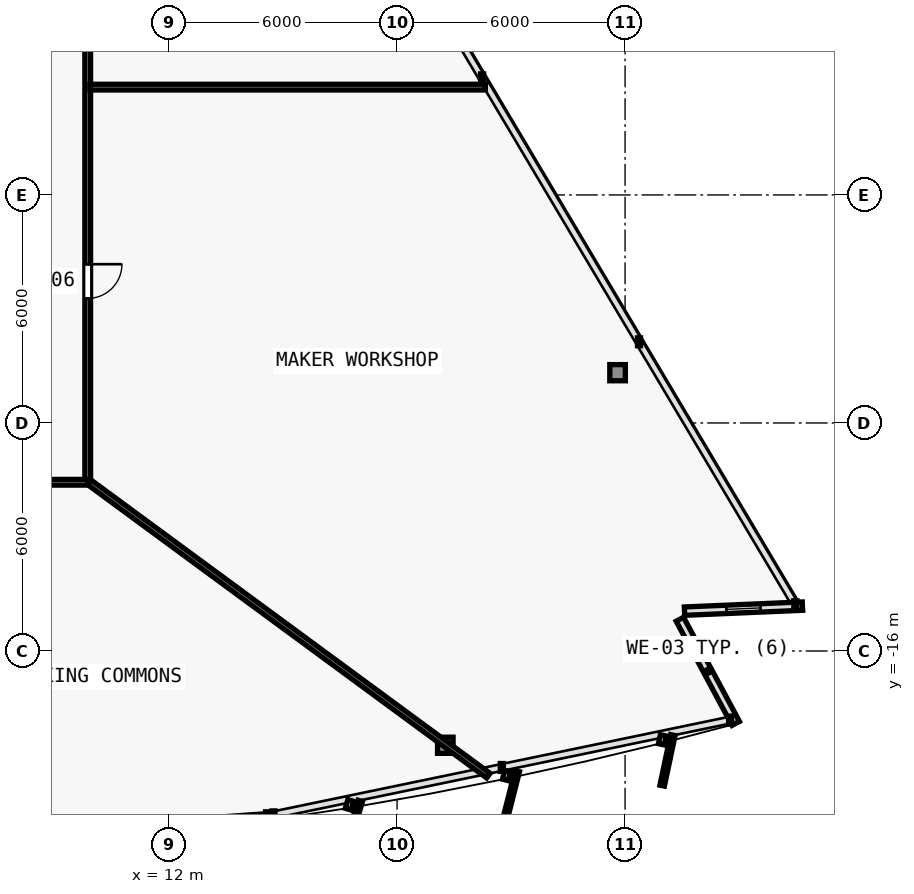
"""IFC4 building model, lengths in metres.
Left out: names, types, materials, properties, quantities, classifications, styles, units other than length and angle.
Written with IfcOpenShell. Run it as: python <this file> out.ifc"""

import sys

from ifc_helpers import new_model, si_unit, direction, frame, frame_2d, origin, origin_2d, place, context, subcontext, project, spatial, rectangle, i_section, extrude, element, fill, save


model = new_model("IFC4")
c1 = context("Model", 3, precision=1e-05, world=origin(), true_north=direction((0.0, 1.0)))
c2 = subcontext(c1, "Body", "Model", "MODEL_VIEW")
j1 = project(units=[si_unit("LENGTHUNIT", "METRE"), si_unit("PLANEANGLEUNIT", "RADIAN")], contexts=[c1])
p1 = place(None, origin())
s1 = spatial("IfcSite", under=j1, at=p1, CompositionType="ELEMENT")
p2 = place(p1, origin())
s2 = spatial("IfcBuilding", under=s1, at=p2, CompositionType="ELEMENT")
p3 = place(p2, frame((0.0, 0.0, 82.5)))
s3 = spatial("IfcBuildingStorey", under=s2, at=p3, CompositionType="ELEMENT", Elevation=82.5)
p4 = place(p3, frame((19.269, -18.48, 0.006), z_axis=(-0.020596292833, 0.033511459955, 0.999226087917), x_axis=(-0.851954850327, -0.523615252838, 0.0)))
e1 = element("IfcColumn", 1, at=p4, inside=s3, PredefinedType="COLUMN", context=c2, shape_type="SweptSolid", body=[
    extrude(i_section(OverallWidth=0.409, OverallDepth=0.425, WebThickness=0.021, FlangeThickness=0.034, FilletRadius=0.015, at=origin_2d()), origin(), (0.0, 0.0, 1.0), 3.592),
])
p5 = place(p3, frame((23.802, -8.677, 0.006), z_axis=(-0.026039494941, 0.021620259507, 0.999427090428), x_axis=(-0.638800249892, -0.769372628015, 0.0)))
e2 = element("IfcColumn", 2, at=p5, inside=s3, PredefinedType="COLUMN", context=c2, shape_type="SweptSolid", body=[
    extrude(i_section(OverallWidth=0.409, OverallDepth=0.425, WebThickness=0.021, FlangeThickness=0.034, FilletRadius=0.015, at=origin_2d()), origin(), (0.0, 0.0, 1.0), 3.591),
])
p6 = place(p3, frame((25.442, -15.165, 0.0), z_axis=(0.0, 0.0, 1.0), x_axis=(0.472811757317, -0.881163459378, 0.0)))
e3 = element("IfcWall", 3, at=p6, inside=s3, PredefinedType="SOLIDWALL", context=c2, shape_type="SweptSolid", body=[
    extrude(rectangle(XDim=3.11, YDim=0.22, at=frame_2d((1.555, 0.0))), origin(), (0.0, 0.0, 1.0), 3.35),
])
p7 = place(p3, frame((28.667, -14.819, 0.0), z_axis=(0.0, 0.0, 1.0), x_axis=(-0.99909228571, -0.042598176436, 0.0)))
e4 = element("IfcWall", 4, at=p7, inside=s3, PredefinedType="SOLIDWALL", context=c2, shape_type="SweptSolid", body=[
    extrude(rectangle(XDim=3.106, YDim=0.22, at=frame_2d((1.553, 0.0))), origin(), (0.0, 0.0, 1.0), 3.35),
])
p8 = place(p7, frame((1.103, 0.0, 0.62)))
e5 = element("IfcOpeningElement", 5, at=p8, cuts=e4, PredefinedType="OPENING", context=c2, shape_type="SweptSolid", body=[
    extrude(rectangle(XDim=0.9, YDim=1.6, at=frame_2d((0.45, 0.8))), frame((0.0, 0.12, 0.0), z_axis=(0.0, -1.0, 0.0), x_axis=(1.0, 0.0, 0.0)), (0.0, 0.0, 1.0), 0.24),
])
p9 = place(p3, frame((9.86, 8.426, 0.0), z_axis=(0.0, 0.0, 1.0), x_axis=(0.0, -1.0, 0.0)))
e6 = element("IfcWall", 6, at=p9, inside=s3, PredefinedType="PARTITIONING", context=c2, shape_type="SweptSolid", body=[
    extrude(rectangle(XDim=19.986, YDim=0.15, at=frame_2d((9.993, 0.0))), origin(), (0.0, 0.0, 1.0), 2.609),
])
p10 = place(p9, frame((14.248, 0.0, 0.0)))
e7 = element("IfcOpeningElement", 7, at=p10, cuts=e6, PredefinedType="OPENING", context=c2, shape_type="SweptSolid", body=[
    extrude(rectangle(XDim=0.9, YDim=2.1, at=frame_2d((0.45, 1.05))), frame((0.0, 0.085, 0.0), z_axis=(0.0, -1.0, 0.0), x_axis=(1.0, 0.0, 0.0)), (0.0, 0.0, 1.0), 0.17),
])
p11 = place(p9, frame((4.434, 0.0, 0.0)))
e8 = element("IfcOpeningElement", 8, at=p11, cuts=e6, PredefinedType="OPENING", context=c2, shape_type="SweptSolid", body=[
    extrude(rectangle(XDim=0.9, YDim=2.1, at=frame_2d((0.45, 1.05))), frame((0.0, 0.085, 0.0), z_axis=(0.0, -1.0, 0.0), x_axis=(1.0, 0.0, 0.0)), (0.0, 0.0, 1.0), 0.17),
])
p12 = place(p3, frame((9.86, -11.56, 0.0), z_axis=(0.0, 0.0, 1.0), x_axis=(-1.0, 0.0, 0.0)))
e9 = element("IfcWall", 9, at=p12, inside=s3, PredefinedType="PARTITIONING", context=c2, shape_type="SweptSolid", body=[
    extrude(rectangle(XDim=6.78, YDim=0.15, at=frame_2d((3.39, 0.0))), origin(), (0.0, 0.0, 1.0), 3.055),
])
p13 = place(p12, frame((2.94, 0.0, 0.0)))
e10 = element("IfcOpeningElement", 10, at=p13, cuts=e9, PredefinedType="OPENING", context=c2, shape_type="SweptSolid", body=[
    extrude(rectangle(XDim=0.9, YDim=2.1, at=frame_2d((0.45, 1.05))), frame((0.0, 0.085, 0.0), z_axis=(0.0, -1.0, 0.0), x_axis=(1.0, 0.0, 0.0)), (0.0, 0.0, 1.0), 0.17),
])
p14 = place(p3, frame((9.896, -11.558, 0.0), z_axis=(0.0, 0.0, 1.0), x_axis=(0.805759814493, -0.592242451492, 0.0)))
e11 = element("IfcWall", 11, at=p14, inside=s3, PredefinedType="PARTITIONING", context=c2, shape_type="SweptSolid", body=[
    extrude(rectangle(XDim=13.038, YDim=0.15, at=frame_2d((6.519, 0.0))), origin(), (0.0, 0.0, 1.0), 2.725),
])
p15 = place(p3, frame((9.92, -1.163, 0.0), z_axis=(0.0, 0.0, 1.0), x_axis=(1.0, 0.0, 0.0)))
e12 = element("IfcWall", 12, at=p15, inside=s3, PredefinedType="PARTITIONING", context=c2, shape_type="SweptSolid", body=[
    extrude(rectangle(XDim=10.404, YDim=0.15, at=frame_2d((5.202, 0.0))), origin(), (0.0, 0.0, 1.0), 2.725),
])
p16 = place(p8, origin())
e13 = element("IfcWindow", 13, at=p16, inside=s3, PartitioningType="SINGLE_PANEL", PredefinedType="WINDOW", context=c2, shape_type="SweptSolid", body=[
    extrude(rectangle(XDim=0.9, YDim=1.6, at=frame_2d((0.45, 0.8))), frame((0.0, 0.03, 0.0), z_axis=(0.0, -1.0, 0.0), x_axis=(1.0, 0.0, 0.0)), (0.0, 0.0, 1.0), 0.06),
])
fill(e5, e13)
p17 = place(p10, origin())
e14 = element("IfcDoor", 14, at=p17, inside=s3, OperationType="SINGLE_SWING_LEFT", PredefinedType="DOOR", context=c2, shape_type="SweptSolid", body=[
    extrude(rectangle(XDim=0.9, YDim=2.1, at=frame_2d((0.45, 1.05))), frame((0.0, 0.025, 0.0), z_axis=(0.0, -1.0, 0.0), x_axis=(1.0, 0.0, 0.0)), (0.0, 0.0, 1.0), 0.05),
])
fill(e7, e14)
save(model, sys.argv[1])
